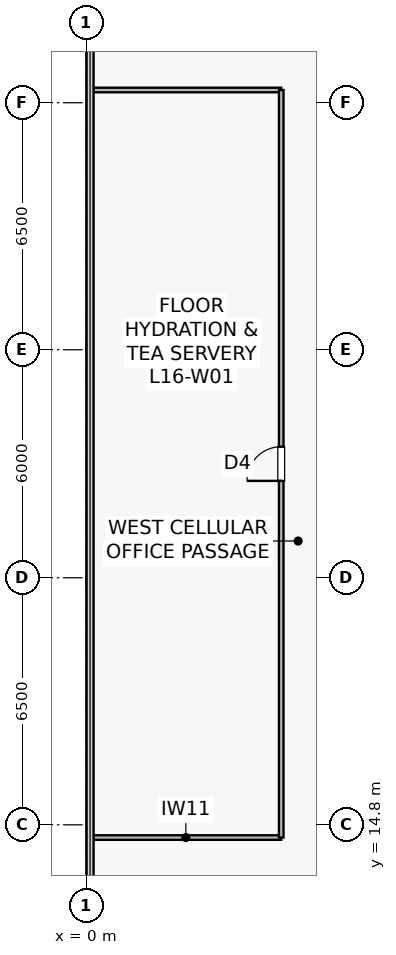
"""IFC4 building model, lengths in metres.
Left out: names, types, materials, properties, quantities, classifications, styles, units other than length and angle.
Written with IfcOpenShell. Run it as: python <this file> out.ifc"""

import sys

from ifc_helpers import new_model, si_unit, direction, frame, frame_2d, origin, place, context, subcontext, project, spatial, rectangle, extrude, source, transform, mapped, element, fill, save


model = new_model("IFC4")
c1 = context("Model", 3, precision=1e-05, world=origin(), true_north=direction((0.0, 1.0)))
c2 = subcontext(c1, "Body", "Model", "MODEL_VIEW")
j1 = project(units=[si_unit("LENGTHUNIT", "METRE"), si_unit("PLANEANGLEUNIT", "RADIAN")], contexts=[c1])
p1 = place(None, origin())
s1 = spatial("IfcSite", under=j1, at=p1, CompositionType="ELEMENT")
p2 = place(p1, origin())
s2 = spatial("IfcBuilding", under=s1, at=p2, CompositionType="ELEMENT")
p3 = place(p2, frame((0.0, 0.0, 66.2)))
s3 = spatial("IfcBuildingStorey", under=s2, at=p3, CompositionType="ELEMENT", Elevation=66.2)
for number, where, z_axis, x_axis in (
    (1, (0.11, 14.465, 0.0), (0.0, 0.0, 1.0), (1.0, 0.0, 0.0)),
    (2, (0.11, 34.135, 0.0), (0.0, 0.0, 1.0), (1.0, 0.0, 0.0)),
):
    element("IfcWall", number, at=place(p3, frame(where, z_axis=z_axis, x_axis=x_axis)), inside=s3, PredefinedType="PARTITIONING", context=c2, shape_type="SweptSolid", body=[
        extrude(rectangle(XDim=5.02, YDim=0.12, at=frame_2d((2.51, 0.0))), origin(), (0.0, 0.0, 1.0), 3.78),
    ])
p4 = place(p3, frame((5.13, 14.465, 0.0), z_axis=(0.0, 0.0, 1.0), x_axis=(0.0, 1.0, 0.0)))
e3 = element("IfcWall", 3, at=p4, inside=s3, PredefinedType="PARTITIONING", context=c2, shape_type="SweptSolid", body=[
    extrude(rectangle(XDim=19.67, YDim=0.12, at=frame_2d((9.835, 0.0))), origin(), (0.0, 0.0, 1.0), 3.78),
])
p5 = place(p4, frame((9.385, 0.0, 0.0)))
e4 = element("IfcOpeningElement", 4, at=p5, cuts=e3, PredefinedType="OPENING", context=c2, shape_type="SweptSolid", body=[
    extrude(rectangle(XDim=0.9, YDim=2.1, at=frame_2d((0.45, 1.05))), frame((0.0, 0.07, 0.0), z_axis=(0.0, -1.0, 0.0), x_axis=(1.0, 0.0, 0.0)), (0.0, 0.0, 1.0), 0.14),
])
m1 = source(origin(), c2, "Body", "SweptSolid", [
    extrude(rectangle(XDim=0.9, YDim=2.1, at=frame_2d((0.45, 1.05))), frame((0.0, 0.025, 0.0), z_axis=(0.0, -1.0, 0.0), x_axis=(1.0, 0.0, 0.0)), (0.0, 0.0, 1.0), 0.05),
])
p6 = place(p5, origin())
e5 = element("IfcDoor", 5, at=p6, inside=s3, OperationType="SINGLE_SWING_LEFT", PredefinedType="DOOR", context=c2, shape_type="MappedRepresentation", body=[
    mapped(m1, transform((0.0, 0.0, 0.0), scale=1.0)),
])
fill(e4, e5)
save(model, sys.argv[1])
